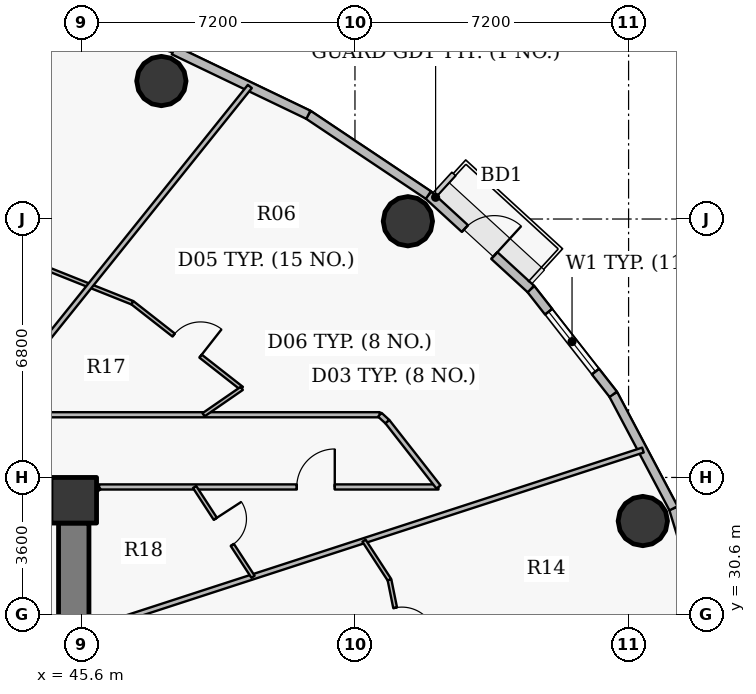
"""IFC4 building model, lengths in metres.
Left out: names, types, materials, properties, quantities, classifications, styles, units other than length and angle.
Written with IfcOpenShell. Run it as: python <this file> out.ifc"""

import sys

from ifc_helpers import new_model, si_unit, direction, frame, frame_2d, origin, origin_2d, place, context, subcontext, project, spatial, rectangle, hollow_circle, extrude, source, transform, mapped, element, fill, save


model = new_model("IFC4")
c1 = context("Model", 3, precision=1e-05, world=origin(), true_north=direction((0.0, 1.0)))
c2 = subcontext(c1, "Body", "Model", "MODEL_VIEW")
j1 = project(units=[si_unit("LENGTHUNIT", "METRE"), si_unit("PLANEANGLEUNIT", "RADIAN")], contexts=[c1])
p1 = place(None, origin())
s1 = spatial("IfcSite", under=j1, at=p1, CompositionType="ELEMENT")
p2 = place(p1, origin())
s2 = spatial("IfcBuilding", under=s1, at=p2, CompositionType="ELEMENT")
p3 = place(p2, frame((0.0, 0.0, 159.9)))
s3 = spatial("IfcBuildingStorey", under=s2, at=p3, CompositionType="ELEMENT", Elevation=159.9)
p4 = place(p3, frame((45.4, 33.6, 0.0), z_axis=(0.0, 0.0, 1.0), x_axis=(1.0, 0.0, 0.0)))
e1 = element("IfcColumn", 1, at=p4, inside=s3, PredefinedType="COLUMN", context=c2, shape_type="SweptSolid", body=[
    extrude(rectangle(XDim=1.2, YDim=1.2, at=origin_2d()), origin(), (0.0, 0.0, 1.0), 3.75),
])
p5 = place(p3, frame((45.4, 33.0, 0.0), z_axis=(0.0, 0.0, 1.0), x_axis=(0.0, -1.0, 0.0)))
e2 = element("IfcWall", 2, at=p5, inside=s3, PredefinedType="SHEAR", context=c2, shape_type="SweptSolid", body=[
    extrude(rectangle(XDim=12.0, YDim=0.8, at=frame_2d((6.0, 0.0))), origin(), (0.0, 0.0, 1.0), 2.95),
])
for number, where, z_axis, x_axis in (
    (3, (60.375, 33.053, 0.0), (0.0, 0.0, 1.0), (1.0, 0.0, 0.0)),
    (4, (54.192, 40.942, 0.0), (0.0, 0.0, 1.0), (1.0, 0.0, 0.0)),
    (5, (47.706, 44.631, 0.0), (0.0, 0.0, 1.0), (1.0, 0.0, 0.0)),
):
    element("IfcColumn", number, at=place(p3, frame(where, z_axis=z_axis, x_axis=x_axis)), inside=s3, PredefinedType="COLUMN", context=c2, shape_type="SweptSolid", body=[
        extrude(hollow_circle(Radius=0.65, WallThickness=0.04, at=origin_2d()), origin(), (0.0, 0.0, 1.0), 3.75),
    ])
p6 = place(p3, frame((61.183, 33.389, 0.0), z_axis=(0.0, 0.0, 1.0), x_axis=(0.293097995113, -0.956082405058, 0.0)))
e6 = element("IfcWall", 6, at=p6, inside=s3, PredefinedType="SOLIDWALL", context=c2, shape_type="SweptSolid", body=[
    extrude(rectangle(XDim=3.3, YDim=0.24, at=frame_2d((1.65, 0.0))), origin(), (0.0, 0.0, 1.0), 3.5),
])
p7 = place(p3, frame((59.596, 36.388, 0.0), z_axis=(0.0, 0.0, 1.0), x_axis=(0.467586874938, -0.88394712194, 0.0)))
e7 = element("IfcWall", 7, at=p7, inside=s3, PredefinedType="SOLIDWALL", context=c2, shape_type="SweptSolid", body=[
    extrude(rectangle(XDim=3.393, YDim=0.24, at=frame_2d((1.697, 0.0))), origin(), (0.0, 0.0, 1.0), 3.5),
])
p8 = place(p3, frame((57.428, 39.158, 0.0), z_axis=(0.0, 0.0, 1.0), x_axis=(0.616287674549, -0.787521112224, 0.0)))
e8 = element("IfcWall", 8, at=p8, inside=s3, PredefinedType="SOLIDWALL", context=c2, shape_type="SweptSolid", body=[
    extrude(rectangle(XDim=3.517, YDim=0.24, at=frame_2d((1.759, 0.0))), origin(), (0.0, 0.0, 1.0), 3.5),
])
p9 = place(p8, frame((0.759, 0.0, 0.9)))
e9 = element("IfcOpeningElement", 9, at=p9, cuts=e8, PredefinedType="OPENING", context=c2, shape_type="SweptSolid", body=[
    extrude(rectangle(XDim=2.0, YDim=1.75, at=origin_2d()), frame((1.0, 0.13, 0.875), z_axis=(0.0, -1.0, 0.0), x_axis=(1.0, 0.0, 0.0)), (0.0, 0.0, 1.0), 0.26),
])
p10 = place(p3, frame((54.732, 41.631, 0.0), z_axis=(0.0, 0.0, 1.0), x_axis=(0.737076565834, -0.675809245349, 0.0)))
e10 = element("IfcWall", 10, at=p10, inside=s3, PredefinedType="SOLIDWALL", context=c2, shape_type="SweptSolid", body=[
    extrude(rectangle(XDim=3.658, YDim=0.24, at=frame_2d((1.829, 0.0))), origin(), (0.0, 0.0, 1.0), 3.5),
])
p11 = place(p10, frame((1.304, 0.0, 0.0)))
e11 = element("IfcOpeningElement", 11, at=p11, cuts=e10, PredefinedType="OPENING", context=c2, shape_type="SweptSolid", body=[
    extrude(rectangle(XDim=1.05, YDim=2.15, at=origin_2d()), frame((0.525, 0.13, 1.075), z_axis=(0.0, -1.0, 0.0), x_axis=(1.0, 0.0, 0.0)), (0.0, 0.0, 1.0), 0.26),
])
p12 = place(p3, frame((51.573, 43.743, 0.0), z_axis=(0.0, 0.0, 1.0), x_axis=(0.831228998277, -0.555930168657, 0.0)))
e12 = element("IfcWall", 12, at=p12, inside=s3, PredefinedType="SOLIDWALL", context=c2, shape_type="SweptSolid", body=[
    extrude(rectangle(XDim=3.8, YDim=0.24, at=frame_2d((1.9, 0.0))), origin(), (0.0, 0.0, 1.0), 3.5),
])
p13 = place(p3, frame((48.03, 45.444, 0.0), z_axis=(0.0, 0.0, 1.0), x_axis=(0.901564733809, -0.432644231155, 0.0)))
e13 = element("IfcWall", 13, at=p13, inside=s3, PredefinedType="SOLIDWALL", context=c2, shape_type="SweptSolid", body=[
    extrude(rectangle(XDim=3.93, YDim=0.24, at=frame_2d((1.965, 0.0))), origin(), (0.0, 0.0, 1.0), 3.5),
])
p14 = place(p3, frame((24.35, 35.85, 0.0), z_axis=(0.0, 0.0, 1.0), x_axis=(1.0, 0.0, 0.0)))
e14 = element("IfcWall", 14, at=p14, inside=s3, PredefinedType="PARTITIONING", context=c2, shape_type="SweptSolid", body=[
    extrude(rectangle(XDim=29.104, YDim=0.135, at=frame_2d((14.552, 0.0))), origin(), (0.0, 0.0, 1.0), 2.935),
])
p15 = place(p14, frame((15.972, 0.0, 0.0)))
e15 = element("IfcOpeningElement", 15, at=p15, cuts=e14, PredefinedType="OPENING", context=c2, shape_type="SweptSolid", body=[
    extrude(rectangle(XDim=1.0, YDim=2.15, at=origin_2d()), frame((0.5, 0.078, 1.075), z_axis=(0.0, -1.0, 0.0), x_axis=(1.0, 0.0, 0.0)), (0.0, 0.0, 1.0), 0.155),
])
p16 = place(p14, frame((4.074, 0.0, 0.0)))
e16 = element("IfcOpeningElement", 16, at=p16, cuts=e14, PredefinedType="OPENING", context=c2, shape_type="SweptSolid", body=[
    extrude(rectangle(XDim=1.0, YDim=2.15, at=origin_2d()), frame((0.5, 0.078, 1.075), z_axis=(0.0, -1.0, 0.0), x_axis=(1.0, 0.0, 0.0)), (0.0, 0.0, 1.0), 0.155),
])
p17 = place(p3, frame((41.754, 40.867, 0.0), z_axis=(0.0, 0.0, 1.0), x_axis=(0.928789673623, -0.370607261359, 0.0)))
e17 = element("IfcWall", 17, at=p17, inside=s3, PredefinedType="PARTITIONING", context=c2, shape_type="SweptSolid", body=[
    extrude(rectangle(XDim=5.589, YDim=0.1, at=frame_2d((2.794, 0.0))), origin(), (0.0, 0.0, 1.0), 2.935),
])
p18 = place(p3, frame((43.102, 35.85, 0.0), z_axis=(0.0, 0.0, 1.0), x_axis=(0.62588794771, 0.779912993168, 0.0)))
e18 = element("IfcWall", 18, at=p18, inside=s3, PredefinedType="PARTITIONING", context=c2, shape_type="SweptSolid", body=[
    extrude(rectangle(XDim=11.075, YDim=0.135, at=frame_2d((5.538, 0.0))), origin(), (0.0, 0.0, 1.0), 2.935),
])
p19 = place(p3, frame((46.065, 33.95, 0.0), z_axis=(0.0, 0.0, 1.0), x_axis=(1.0, 0.0, 0.0)))
e19 = element("IfcWall", 19, at=p19, inside=s3, PredefinedType="PARTITIONING", context=c2, shape_type="SweptSolid", body=[
    extrude(rectangle(XDim=8.932, YDim=0.135, at=frame_2d((4.466, 0.0))), origin(), (0.0, 0.0, 1.0), 3.5),
])
p20 = place(p19, frame((5.204, 0.0, 0.0)))
e20 = element("IfcOpeningElement", 20, at=p20, cuts=e19, PredefinedType="OPENING", context=c2, shape_type="SweptSolid", body=[
    extrude(rectangle(XDim=1.0, YDim=2.15, at=origin_2d()), frame((0.5, 0.078, 1.075), z_axis=(0.0, -1.0, 0.0), x_axis=(1.0, 0.0, 0.0)), (0.0, 0.0, 1.0), 0.155),
])
p21 = place(p3, frame((46.71, 30.48, 0.0), z_axis=(0.0, 0.0, 1.0), x_axis=(0.951054665008, 0.309022691992, 0.0)))
e21 = element("IfcWall", 21, at=p21, inside=s3, PredefinedType="PARTITIONING", context=c2, shape_type="SweptSolid", body=[
    extrude(rectangle(XDim=14.372, YDim=0.135, at=frame_2d((7.186, 0.0))), origin(), (0.0, 0.0, 1.0), 2.935),
])
p22 = place(p3, frame((46.945, 38.796, 0.0), z_axis=(0.0, 0.0, 1.0), x_axis=(0.787307530322, -0.616560502058, 0.0)))
e22 = element("IfcWall", 22, at=p22, inside=s3, PredefinedType="PARTITIONING", context=c2, shape_type="SweptSolid", body=[
    extrude(rectangle(XDim=3.653, YDim=0.1, at=frame_2d((1.827, 0.0))), origin(), (0.0, 0.0, 1.0), 2.935),
])
p23 = place(p22, frame((1.377, 0.0, 0.0)))
e23 = element("IfcOpeningElement", 23, at=p23, cuts=e22, PredefinedType="OPENING", context=c2, shape_type="SweptSolid", body=[
    extrude(rectangle(XDim=0.9, YDim=2.1, at=origin_2d()), frame((0.45, 0.06, 1.05), z_axis=(0.0, -1.0, 0.0), x_axis=(1.0, 0.0, 0.0)), (0.0, 0.0, 1.0), 0.12),
])
p24 = place(p3, frame((48.58, 33.95, 0.0), z_axis=(0.0, 0.0, 1.0), x_axis=(0.545393120499, -0.838180376836, 0.0)))
e24 = element("IfcWall", 24, at=p24, inside=s3, PredefinedType="PARTITIONING", context=c2, shape_type="SweptSolid", body=[
    extrude(rectangle(XDim=2.819, YDim=0.1, at=frame_2d((1.41, 0.0))), origin(), (0.0, 0.0, 1.0), 3.5),
])
p25 = place(p24, frame((1.0, 0.0, 0.0)))
e25 = element("IfcOpeningElement", 25, at=p25, cuts=e24, PredefinedType="OPENING", context=c2, shape_type="SweptSolid", body=[
    extrude(rectangle(XDim=0.82, YDim=2.1, at=origin_2d()), frame((0.41, 0.06, 1.05), z_axis=(0.0, -1.0, 0.0), x_axis=(1.0, 0.0, 0.0)), (0.0, 0.0, 1.0), 0.12),
])
p26 = place(p3, frame((48.816, 35.85, 0.0), z_axis=(0.0, 0.0, 1.0), x_axis=(0.822832340307, 0.568284206841, 0.0)))
e26 = element("IfcWall", 26, at=p26, inside=s3, PredefinedType="PARTITIONING", context=c2, shape_type="SweptSolid", body=[
    extrude(rectangle(XDim=1.221, YDim=0.1, at=frame_2d((0.61, 0.0))), origin(), (0.0, 0.0, 1.0), 3.5),
])
p27 = place(p3, frame((53.038, 32.536, 0.0), z_axis=(0.0, 0.0, 1.0), x_axis=(0.545407162254, -0.83817123988, 0.0)))
e27 = element("IfcWall", 27, at=p27, inside=s3, PredefinedType="PARTITIONING", context=c2, shape_type="SweptSolid", body=[
    extrude(rectangle(XDim=1.229, YDim=0.1, at=frame_2d((0.615, 0.0))), origin(), (0.0, 0.0, 1.0), 2.935),
])
p28 = place(p3, frame((53.454, 35.85, 0.0), z_axis=(0.0, 0.0, 1.0), x_axis=(0.736667385572, -0.676255249913, 0.0)))
e28 = element("IfcWall", 28, at=p28, inside=s3, PredefinedType="PARTITIONING", context=c2, shape_type="SweptSolid", body=[
    extrude(rectangle(XDim=0.271, YDim=0.135, at=frame_2d((0.135, 0.0))), origin(), (0.0, 0.0, 1.0), 3.5),
])
p29 = place(p3, frame((53.653, 35.667, 0.0), z_axis=(0.0, 0.0, 1.0), x_axis=(0.616302223209, -0.787509726713, 0.0)))
e29 = element("IfcWall", 29, at=p29, inside=s3, PredefinedType="PARTITIONING", context=c2, shape_type="SweptSolid", body=[
    extrude(rectangle(XDim=2.18, YDim=0.135, at=frame_2d((1.09, 0.0))), origin(), (0.0, 0.0, 1.0), 3.5),
])
p30 = place(p3, frame((53.709, 31.506, 0.0), z_axis=(0.0, 0.0, 1.0), x_axis=(0.198209478932, -0.980159682124, 0.0)))
e30 = element("IfcWall", 30, at=p30, inside=s3, PredefinedType="PARTITIONING", context=c2, shape_type="SweptSolid", body=[
    extrude(rectangle(XDim=4.597, YDim=0.1, at=frame_2d((2.298, 0.0))), origin(), (0.0, 0.0, 1.0), 2.935),
])
p31 = place(p30, frame((0.75, 0.0, 0.0)))
e31 = element("IfcOpeningElement", 31, at=p31, cuts=e30, PredefinedType="OPENING", context=c2, shape_type="SweptSolid", body=[
    extrude(rectangle(XDim=0.9, YDim=2.1, at=origin_2d()), frame((0.45, 0.06, 1.05), z_axis=(0.0, -1.0, 0.0), x_axis=(1.0, 0.0, 0.0)), (0.0, 0.0, 1.0), 0.12),
])
p32 = place(p3, frame((45.8, 34.0, 0.0), z_axis=(0.0, 0.0, 1.0), x_axis=(-1.0, 0.0, 0.0)))
e32 = element("IfcWall", 32, at=p32, inside=s3, PredefinedType="PARTITIONING", context=c2, shape_type="SweptSolid", body=[
    extrude(rectangle(XDim=0.99, YDim=0.135, at=frame_2d((0.495, 0.0))), origin(), (0.0, 0.0, 1.0), 2.935),
])
p33 = place(p3, frame((45.8, 33.01, 0.0), z_axis=(0.0, 0.0, 1.0), x_axis=(0.0, 1.0, 0.0)))
e33 = element("IfcWall", 33, at=p33, inside=s3, PredefinedType="PARTITIONING", context=c2, shape_type="SweptSolid", body=[
    extrude(rectangle(XDim=0.682, YDim=0.15, at=frame_2d((0.341, 0.0))), origin(), (0.0, 0.0, 1.0), 3.5),
])
p34 = place(p3, frame((45.8, 33.767, 0.0), z_axis=(0.0, 0.0, 1.0), x_axis=(0.823065918238, 0.56794585502, 0.0)))
e34 = element("IfcWall", 34, at=p34, inside=s3, PredefinedType="PARTITIONING", context=c2, shape_type="SweptSolid", body=[
    extrude(rectangle(XDim=0.322, YDim=0.15, at=frame_2d((0.161, 0.0))), origin(), (0.0, 0.0, 1.0), 3.5),
])
m1 = source(origin(), c2, "Body", "SweptSolid", [
    extrude(rectangle(XDim=2.0, YDim=1.75, at=origin_2d()), frame((1.0, 0.03, 0.875), z_axis=(0.0, -1.0, 0.0), x_axis=(1.0, 0.0, 0.0)), (0.0, 0.0, 1.0), 0.06),
])
p35 = place(p9, origin())
e35 = element("IfcWindow", 35, at=p35, inside=s3, PartitioningType="DOUBLE_PANEL_VERTICAL", PredefinedType="WINDOW", context=c2, shape_type="MappedRepresentation", body=[
    mapped(m1, transform((0.0, 0.0, 0.0), x_axis=(1.0, 0.0, 0.0), y_axis=(0.0, 1.0, 0.0), z_axis=(0.0, 0.0, 1.0), scale=1.0)),
])
fill(e9, e35)
m2 = source(origin(), c2, "Body", "SweptSolid", [
    extrude(rectangle(XDim=1.05, YDim=2.15, at=origin_2d()), frame((0.525, 0.025, 1.075), z_axis=(0.0, -1.0, 0.0), x_axis=(1.0, 0.0, 0.0)), (0.0, 0.0, 1.0), 0.05),
])
p36 = place(p11, origin())
e36 = element("IfcDoor", 36, at=p36, inside=s3, OperationType="SINGLE_SWING_RIGHT", PredefinedType="DOOR", context=c2, shape_type="MappedRepresentation", body=[
    mapped(m2, transform((0.0, 0.0, 0.0), x_axis=(1.0, 0.0, 0.0), y_axis=(0.0, 1.0, 0.0), z_axis=(0.0, 0.0, 1.0), scale=1.0)),
])
fill(e11, e36)
m3 = source(origin(), c2, "Body", "SweptSolid", [
    extrude(rectangle(XDim=1.0, YDim=2.15, at=origin_2d()), frame((0.5, 0.025, 1.075), z_axis=(0.0, -1.0, 0.0), x_axis=(1.0, 0.0, 0.0)), (0.0, 0.0, 1.0), 0.05),
])
p37 = place(p20, origin())
e37 = element("IfcDoor", 37, at=p37, inside=s3, OperationType="SINGLE_SWING_RIGHT", PredefinedType="DOOR", context=c2, shape_type="MappedRepresentation", body=[
    mapped(m3, transform((0.0, 0.0, 0.0), x_axis=(1.0, 0.0, 0.0), y_axis=(0.0, 1.0, 0.0), z_axis=(0.0, 0.0, 1.0), scale=1.0)),
])
fill(e20, e37)
m4 = source(origin(), c2, "Body", "SweptSolid", [
    extrude(rectangle(XDim=0.82, YDim=2.1, at=origin_2d()), frame((0.41, 0.025, 1.05), z_axis=(0.0, -1.0, 0.0), x_axis=(1.0, 0.0, 0.0)), (0.0, 0.0, 1.0), 0.05),
])
p38 = place(p25, origin())
e38 = element("IfcDoor", 38, at=p38, inside=s3, OperationType="SINGLE_SWING_LEFT", PredefinedType="DOOR", context=c2, shape_type="MappedRepresentation", body=[
    mapped(m4, transform((0.0, 0.0, 0.0), x_axis=(1.0, 0.0, 0.0), y_axis=(0.0, 1.0, 0.0), z_axis=(0.0, 0.0, 1.0), scale=1.0)),
])
fill(e25, e38)
m5 = source(origin(), c2, "Body", "SweptSolid", [
    extrude(rectangle(XDim=0.9, YDim=2.1, at=origin_2d()), frame((0.45, 0.025, 1.05), z_axis=(0.0, -1.0, 0.0), x_axis=(1.0, 0.0, 0.0)), (0.0, 0.0, 1.0), 0.05),
])
p39 = place(p23, origin())
e39 = element("IfcDoor", 39, at=p39, inside=s3, OperationType="SINGLE_SWING_RIGHT", PredefinedType="DOOR", context=c2, shape_type="MappedRepresentation", body=[
    mapped(m5, transform((0.0, 0.0, 0.0), x_axis=(1.0, 0.0, 0.0), y_axis=(0.0, 1.0, 0.0), z_axis=(0.0, 0.0, 1.0), scale=1.0)),
])
fill(e23, e39)
p40 = place(p31, origin())
e40 = element("IfcDoor", 40, at=p40, inside=s3, OperationType="SINGLE_SWING_RIGHT", PredefinedType="DOOR", context=c2, shape_type="MappedRepresentation", body=[
    mapped(m5, transform((0.0, 0.0, 0.0), x_axis=(1.0, 0.0, 0.0), y_axis=(0.0, 1.0, 0.0), z_axis=(0.0, 0.0, 1.0), scale=1.0)),
])
fill(e31, e40)
save(model, sys.argv[1])
